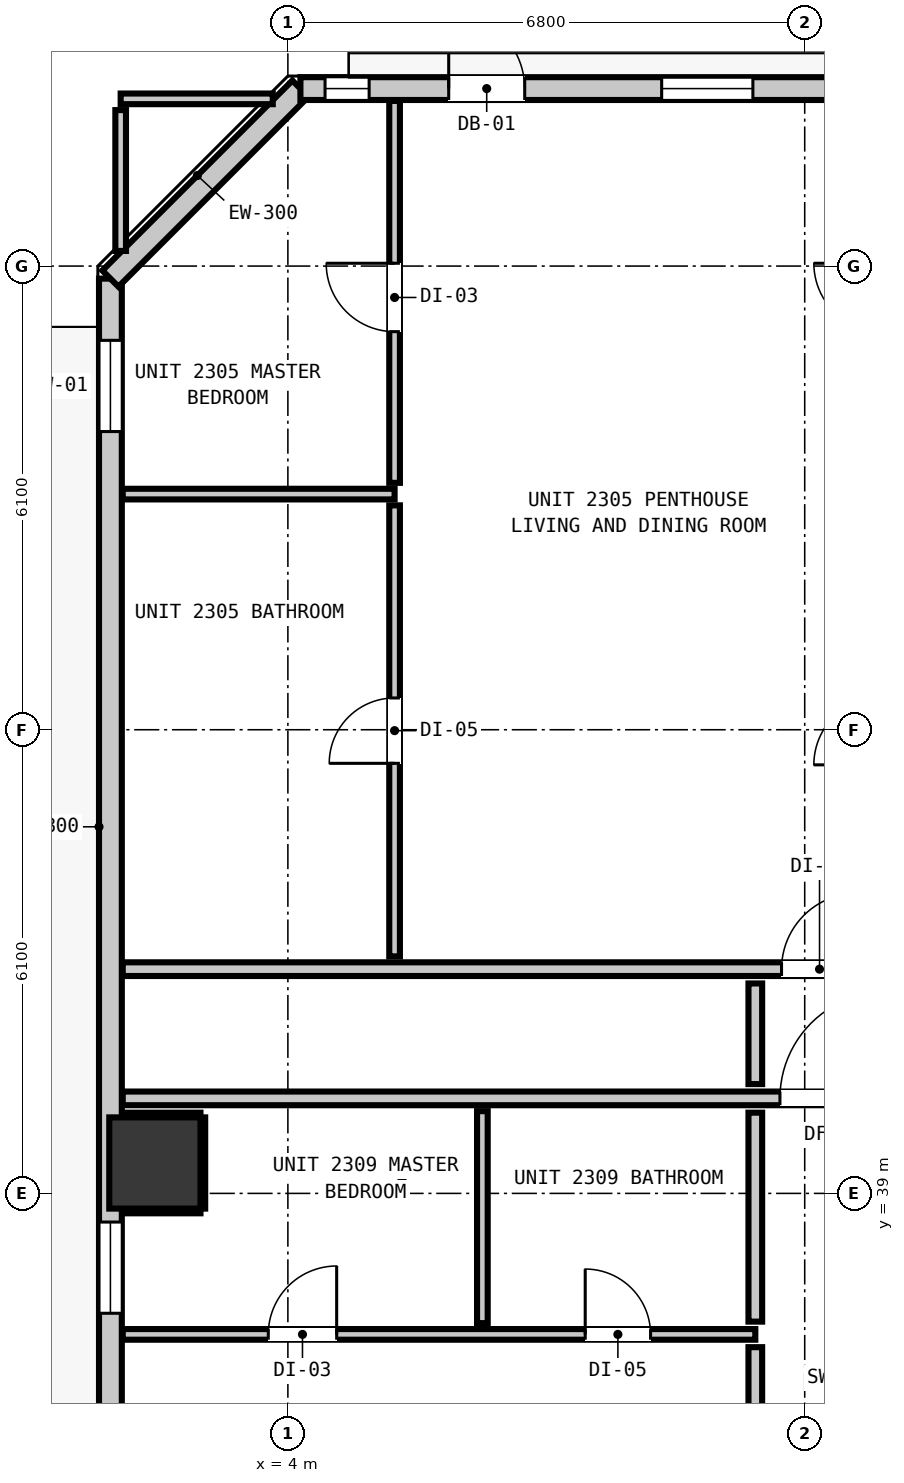
"""IFC4 building model, lengths in metres.
Left out: names, types, materials, properties, quantities, classifications, styles, units other than length and angle.
Written with IfcOpenShell. Run it as: python <this file> out.ifc"""

import sys

from ifc_helpers import new_model, si_unit, direction, frame, frame_2d, origin, origin_2d, place, context, subcontext, project, spatial, rectangle, extrude, element, fill, save


model = new_model("IFC4")
c1 = context("Model", 3, precision=1e-05, world=origin(), true_north=direction((0.0, 1.0)))
c2 = subcontext(c1, "Body", "Model", "MODEL_VIEW")
j1 = project(units=[si_unit("LENGTHUNIT", "METRE"), si_unit("PLANEANGLEUNIT", "RADIAN")], contexts=[c1])
p1 = place(None, origin())
s1 = spatial("IfcSite", under=j1, at=p1, CompositionType="ELEMENT")
p2 = place(p1, origin())
s2 = spatial("IfcBuilding", under=s1, at=p2, CompositionType="ELEMENT")
p3 = place(p2, frame((0.0, 0.0, 81.76)))
s3 = spatial("IfcBuildingStorey", under=s2, at=p3, CompositionType="ELEMENT", Elevation=81.76)
p4 = place(p3, frame((2.25, 39.4, -0.2), z_axis=(0.0, 0.0, 1.0), x_axis=(1.0, 0.0, 0.0)))
e1 = element("IfcColumn", 1, at=p4, inside=s3, PredefinedType="COLUMN", context=c2, shape_type="SweptSolid", body=[
    extrude(rectangle(XDim=1.2, YDim=1.2, at=origin_2d()), origin(), (0.0, 0.0, 1.0), 3.52),
])
p5 = place(p3, frame((1.665, 16.365, 0.0), z_axis=(0.0, 0.0, 1.0), x_axis=(0.0, 1.0, 0.0)))
e2 = element("IfcWall", 2, at=p5, inside=s3, PredefinedType="STANDARD", context=c2, shape_type="SweptSolid", body=[
    extrude(rectangle(XDim=34.67, YDim=0.3, at=frame_2d((17.335, 0.0))), origin(), (0.0, 0.0, 1.0), 3.06),
])
p6 = place(p5, frame((1.251, 0.0, 0.0)))
e3 = element("IfcOpeningElement", 3, at=p6, cuts=e2, PredefinedType="OPENING", context=c2, shape_type="SweptSolid", body=[
    extrude(rectangle(XDim=1.0, YDim=2.15, at=frame_2d((0.5, 1.075))), frame((0.0, 0.16, 0.0), z_axis=(0.0, -1.0, 0.0), x_axis=(1.0, 0.0, 0.0)), (0.0, 0.0, 1.0), 0.32),
])
p7 = place(p5, frame((32.658, 0.0, 0.85)))
e4 = element("IfcOpeningElement", 4, at=p7, cuts=e2, PredefinedType="OPENING", context=c2, shape_type="SweptSolid", body=[
    extrude(rectangle(XDim=1.2, YDim=1.8, at=frame_2d((0.6, 0.9))), frame((0.0, 0.16, 0.0), z_axis=(0.0, -1.0, 0.0), x_axis=(1.0, 0.0, 0.0)), (0.0, 0.0, 1.0), 0.32),
])
p8 = place(p5, frame((8.473, 0.0, 0.85)))
e5 = element("IfcOpeningElement", 5, at=p8, cuts=e2, PredefinedType="OPENING", context=c2, shape_type="SweptSolid", body=[
    extrude(rectangle(XDim=1.2, YDim=1.8, at=frame_2d((0.6, 0.9))), frame((0.0, 0.16, 0.0), z_axis=(0.0, -1.0, 0.0), x_axis=(1.0, 0.0, 0.0)), (0.0, 0.0, 1.0), 0.32),
])
p9 = place(p5, frame((11.623, 0.0, 0.85)))
e6 = element("IfcOpeningElement", 6, at=p9, cuts=e2, PredefinedType="OPENING", context=c2, shape_type="SweptSolid", body=[
    extrude(rectangle(XDim=1.2, YDim=1.8, at=frame_2d((0.6, 0.9))), frame((0.0, 0.16, 0.0), z_axis=(0.0, -1.0, 0.0), x_axis=(1.0, 0.0, 0.0)), (0.0, 0.0, 1.0), 0.32),
])
p10 = place(p5, frame((18.007, 0.0, 0.85)))
e7 = element("IfcOpeningElement", 7, at=p10, cuts=e2, PredefinedType="OPENING", context=c2, shape_type="SweptSolid", body=[
    extrude(rectangle(XDim=1.2, YDim=1.8, at=frame_2d((0.6, 0.9))), frame((0.0, 0.16, 0.0), z_axis=(0.0, -1.0, 0.0), x_axis=(1.0, 0.0, 0.0)), (0.0, 0.0, 1.0), 0.32),
])
p11 = place(p5, frame((21.058, 0.0, 0.85)))
e8 = element("IfcOpeningElement", 8, at=p11, cuts=e2, PredefinedType="OPENING", context=c2, shape_type="SweptSolid", body=[
    extrude(rectangle(XDim=1.2, YDim=1.8, at=frame_2d((0.6, 0.9))), frame((0.0, 0.16, 0.0), z_axis=(0.0, -1.0, 0.0), x_axis=(1.0, 0.0, 0.0)), (0.0, 0.0, 1.0), 0.32),
])
p12 = place(p3, frame((1.665, 51.035, 0.0), z_axis=(0.0, 0.0, 1.0), x_axis=(0.707106781187, 0.707106781187, 0.0)))
e9 = element("IfcWall", 9, at=p12, inside=s3, PredefinedType="STANDARD", context=c2, shape_type="SweptSolid", body=[
    extrude(rectangle(XDim=3.536, YDim=0.3, at=frame_2d((1.768, 0.0))), origin(), (0.0, 0.0, 1.0), 3.06),
])
p13 = place(p3, frame((4.165, 53.535, 0.0), z_axis=(0.0, 0.0, 1.0), x_axis=(1.0, 0.0, 0.0)))
e10 = element("IfcWall", 10, at=p13, inside=s3, PredefinedType="STANDARD", context=c2, shape_type="SweptSolid", body=[
    extrude(rectangle(XDim=37.47, YDim=0.3, at=frame_2d((18.735, 0.0))), origin(), (0.0, 0.0, 1.0), 3.06),
])
p14 = place(p13, frame((1.951, 0.0, 0.0)))
e11 = element("IfcOpeningElement", 11, at=p14, cuts=e10, PredefinedType="OPENING", context=c2, shape_type="SweptSolid", body=[
    extrude(rectangle(XDim=1.0, YDim=2.15, at=frame_2d((0.5, 1.075))), frame((0.0, 0.16, 0.0), z_axis=(0.0, -1.0, 0.0), x_axis=(1.0, 0.0, 0.0)), (0.0, 0.0, 1.0), 0.32),
])
p15 = place(p13, frame((4.753, 0.0, 0.85)))
e12 = element("IfcOpeningElement", 12, at=p15, cuts=e10, PredefinedType="OPENING", context=c2, shape_type="SweptSolid", body=[
    extrude(rectangle(XDim=1.2, YDim=1.8, at=frame_2d((0.6, 0.9))), frame((0.0, 0.16, 0.0), z_axis=(0.0, -1.0, 0.0), x_axis=(1.0, 0.0, 0.0)), (0.0, 0.0, 1.0), 0.32),
])
p16 = place(p13, frame((0.324, 0.0, 0.85)))
e13 = element("IfcOpeningElement", 13, at=p16, cuts=e10, PredefinedType="OPENING", context=c2, shape_type="SweptSolid", body=[
    extrude(rectangle(XDim=0.58, YDim=1.5, at=frame_2d((0.29, 0.75))), frame((0.0, 0.16, 0.0), z_axis=(0.0, -1.0, 0.0), x_axis=(1.0, 0.0, 0.0)), (0.0, 0.0, 1.0), 0.32),
])
p17 = place(p13, frame((10.571, 0.0, 0.85)))
e14 = element("IfcOpeningElement", 14, at=p17, cuts=e10, PredefinedType="OPENING", context=c2, shape_type="SweptSolid", body=[
    extrude(rectangle(XDim=1.2, YDim=1.8, at=frame_2d((0.6, 0.9))), frame((0.0, 0.16, 0.0), z_axis=(0.0, -1.0, 0.0), x_axis=(1.0, 0.0, 0.0)), (0.0, 0.0, 1.0), 0.32),
])
p18 = place(p13, frame((13.671, 0.0, 0.85)))
e15 = element("IfcOpeningElement", 15, at=p18, cuts=e10, PredefinedType="OPENING", context=c2, shape_type="SweptSolid", body=[
    extrude(rectangle(XDim=1.2, YDim=1.8, at=frame_2d((0.6, 0.9))), frame((0.0, 0.16, 0.0), z_axis=(0.0, -1.0, 0.0), x_axis=(1.0, 0.0, 0.0)), (0.0, 0.0, 1.0), 0.32),
])
p19 = place(p13, frame((28.747, 0.0, 0.85)))
e16 = element("IfcOpeningElement", 16, at=p19, cuts=e10, PredefinedType="OPENING", context=c2, shape_type="SweptSolid", body=[
    extrude(rectangle(XDim=1.2, YDim=1.8, at=frame_2d((0.6, 0.9))), frame((0.0, 0.16, 0.0), z_axis=(0.0, -1.0, 0.0), x_axis=(1.0, 0.0, 0.0)), (0.0, 0.0, 1.0), 0.32),
])
p20 = place(p13, frame((26.007, 0.0, 0.85)))
e17 = element("IfcOpeningElement", 17, at=p20, cuts=e10, PredefinedType="OPENING", context=c2, shape_type="SweptSolid", body=[
    extrude(rectangle(XDim=0.58, YDim=1.5, at=frame_2d((0.29, 0.75))), frame((0.0, 0.16, 0.0), z_axis=(0.0, -1.0, 0.0), x_axis=(1.0, 0.0, 0.0)), (0.0, 0.0, 1.0), 0.32),
])
p21 = place(p13, frame((35.832, 0.0, 0.85)))
e18 = element("IfcOpeningElement", 18, at=p21, cuts=e10, PredefinedType="OPENING", context=c2, shape_type="SweptSolid", body=[
    extrude(rectangle(XDim=1.2, YDim=1.8, at=frame_2d((0.6, 0.9))), frame((0.0, 0.16, 0.0), z_axis=(0.0, -1.0, 0.0), x_axis=(1.0, 0.0, 0.0)), (0.0, 0.0, 1.0), 0.32),
])
p22 = place(p3, frame((1.827, 40.25, 0.0), z_axis=(0.0, 0.0, 1.0), x_axis=(1.0, 0.0, 0.0)))
e19 = element("IfcWall", 19, at=p22, inside=s3, PredefinedType="PARTITIONING", context=c2, shape_type="SweptSolid", body=[
    extrude(rectangle(XDim=42.146, YDim=0.18, at=frame_2d((21.073, 0.0))), origin(), (0.0, 0.0, 1.0), 3.06),
])
p23 = place(p22, frame((15.608, 0.0, 0.0)))
e20 = element("IfcOpeningElement", 20, at=p23, cuts=e19, PredefinedType="OPENING", context=c2, shape_type="SweptSolid", body=[
    extrude(rectangle(XDim=1.4, YDim=2.15, at=frame_2d((0.7, 1.075))), frame((0.0, 0.1, 0.0), z_axis=(0.0, -1.0, 0.0), x_axis=(1.0, 0.0, 0.0)), (0.0, 0.0, 1.0), 0.2),
])
p24 = place(p22, frame((8.647, 0.0, 0.0)))
e21 = element("IfcOpeningElement", 21, at=p24, cuts=e19, PredefinedType="OPENING", context=c2, shape_type="SweptSolid", body=[
    extrude(rectangle(XDim=1.4, YDim=2.15, at=frame_2d((0.7, 1.075))), frame((0.0, 0.1, 0.0), z_axis=(0.0, -1.0, 0.0), x_axis=(1.0, 0.0, 0.0)), (0.0, 0.0, 1.0), 0.2),
])
p25 = place(p22, frame((38.524, 0.0, 0.0)))
e22 = element("IfcOpeningElement", 22, at=p25, cuts=e19, PredefinedType="OPENING", context=c2, shape_type="SweptSolid", body=[
    extrude(rectangle(XDim=1.0, YDim=2.15, at=frame_2d((0.5, 1.075))), frame((0.0, 0.1, 0.0), z_axis=(0.0, -1.0, 0.0), x_axis=(1.0, 0.0, 0.0)), (0.0, 0.0, 1.0), 0.2),
])
p26 = place(p3, frame((1.827, 41.95, 0.0), z_axis=(0.0, 0.0, 1.0), x_axis=(1.0, 0.0, 0.0)))
e23 = element("IfcWall", 23, at=p26, inside=s3, PredefinedType="PARTITIONING", context=c2, shape_type="SweptSolid", body=[
    extrude(rectangle(XDim=42.146, YDim=0.18, at=frame_2d((21.073, 0.0))), origin(), (0.0, 0.0, 1.0), 3.06),
])
p27 = place(p26, frame((8.668, 0.0, 0.0)))
e24 = element("IfcOpeningElement", 24, at=p27, cuts=e23, PredefinedType="OPENING", context=c2, shape_type="SweptSolid", body=[
    extrude(rectangle(XDim=1.0, YDim=2.15, at=frame_2d((0.5, 1.075))), frame((0.0, 0.1, 0.0), z_axis=(0.0, -1.0, 0.0), x_axis=(1.0, 0.0, 0.0)), (0.0, 0.0, 1.0), 0.2),
])
p28 = place(p26, frame((18.269, 0.0, 0.0)))
e25 = element("IfcOpeningElement", 25, at=p28, cuts=e23, PredefinedType="OPENING", context=c2, shape_type="SweptSolid", body=[
    extrude(rectangle(XDim=1.0, YDim=2.15, at=frame_2d((0.5, 1.075))), frame((0.0, 0.1, 0.0), z_axis=(0.0, -1.0, 0.0), x_axis=(1.0, 0.0, 0.0)), (0.0, 0.0, 1.0), 0.2),
])
p29 = place(p26, frame((33.01, 0.0, 0.0)))
e26 = element("IfcOpeningElement", 26, at=p29, cuts=e23, PredefinedType="OPENING", context=c2, shape_type="SweptSolid", body=[
    extrude(rectangle(XDim=1.0, YDim=2.15, at=frame_2d((0.5, 1.075))), frame((0.0, 0.1, 0.0), z_axis=(0.0, -1.0, 0.0), x_axis=(1.0, 0.0, 0.0)), (0.0, 0.0, 1.0), 0.2),
])
p30 = place(p3, frame((1.827, 37.145, 0.0), z_axis=(0.0, 0.0, 1.0), x_axis=(1.0, 0.0, 0.0)))
e27 = element("IfcWall", 27, at=p30, inside=s3, PredefinedType="PARTITIONING", context=c2, shape_type="SweptSolid", body=[
    extrude(rectangle(XDim=8.323, YDim=0.14, at=frame_2d((4.162, 0.0))), origin(), (0.0, 0.0, 1.0), 3.06),
])
p31 = place(p30, frame((6.085, 0.0, 0.0)))
e28 = element("IfcOpeningElement", 28, at=p31, cuts=e27, PredefinedType="OPENING", context=c2, shape_type="SweptSolid", body=[
    extrude(rectangle(XDim=0.86, YDim=2.02, at=frame_2d((0.43, 1.01))), frame((0.0, 0.08, 0.0), z_axis=(0.0, -1.0, 0.0), x_axis=(1.0, 0.0, 0.0)), (0.0, 0.0, 1.0), 0.16),
])
p32 = place(p30, frame((1.915, 0.0, 0.0)))
e29 = element("IfcOpeningElement", 29, at=p32, cuts=e27, PredefinedType="OPENING", context=c2, shape_type="SweptSolid", body=[
    extrude(rectangle(XDim=0.9, YDim=2.1, at=frame_2d((0.45, 1.05))), frame((0.0, 0.08, 0.0), z_axis=(0.0, -1.0, 0.0), x_axis=(1.0, 0.0, 0.0)), (0.0, 0.0, 1.0), 0.16),
])
p33 = place(p3, frame((1.827, 48.2, 0.0), z_axis=(0.0, 0.0, 1.0), x_axis=(1.0, 0.0, 0.0)))
e30 = element("IfcWall", 30, at=p33, inside=s3, PredefinedType="PARTITIONING", context=c2, shape_type="SweptSolid", body=[
    extrude(rectangle(XDim=3.577, YDim=0.14, at=frame_2d((1.789, 0.0))), origin(), (0.0, 0.0, 1.0), 3.06),
])
p34 = place(p3, frame((1.8, 53.4, 0.0), z_axis=(0.0, 0.0, 1.0), x_axis=(1.0, 0.0, 0.0)))
e31 = element("IfcWall", 31, at=p34, inside=s3, PredefinedType="PARTITIONING", context=c2, shape_type="SweptSolid", body=[
    extrude(rectangle(XDim=2.001, YDim=0.14, at=frame_2d((1.0, 0.0))), origin(), (0.0, 0.0, 1.0), 3.06),
])
p35 = place(p3, frame((10.15, 33.118, 0.0), z_axis=(0.0, 0.0, 1.0), x_axis=(0.0, 1.0, 0.0)))
e32 = element("IfcWall", 32, at=p35, inside=s3, PredefinedType="PARTITIONING", context=c2, shape_type="SweptSolid", body=[
    extrude(rectangle(XDim=3.859, YDim=0.18, at=frame_2d((1.93, 0.0))), origin(), (0.0, 0.0, 1.0), 3.06),
])
p36 = place(p35, frame((1.353, 0.0, 0.0)))
e33 = element("IfcOpeningElement", 33, at=p36, cuts=e32, PredefinedType="OPENING", context=c2, shape_type="SweptSolid", body=[
    extrude(rectangle(XDim=1.0, YDim=2.15, at=frame_2d((0.5, 1.075))), frame((0.0, 0.1, 0.0), z_axis=(0.0, -1.0, 0.0), x_axis=(1.0, 0.0, 0.0)), (0.0, 0.0, 1.0), 0.2),
])
p37 = place(p3, frame((10.15, 37.313, 0.0), z_axis=(0.0, 0.0, 1.0), x_axis=(0.0, 1.0, 0.0)))
e34 = element("IfcWall", 34, at=p37, inside=s3, PredefinedType="PARTITIONING", context=c2, shape_type="SweptSolid", body=[
    extrude(rectangle(XDim=2.749, YDim=0.18, at=frame_2d((1.375, 0.0))), origin(), (0.0, 0.0, 1.0), 3.06),
])
p38 = place(p3, frame((10.15, 40.438, 0.0), z_axis=(0.0, 0.0, 1.0), x_axis=(0.0, 1.0, 0.0)))
e35 = element("IfcWall", 35, at=p38, inside=s3, PredefinedType="PARTITIONING", context=c2, shape_type="SweptSolid", body=[
    extrude(rectangle(XDim=1.324, YDim=0.18, at=frame_2d((0.662, 0.0))), origin(), (0.0, 0.0, 1.0), 3.06),
])
p39 = place(p3, frame((1.8, 51.399, 0.0), z_axis=(0.0, 0.0, 1.0), x_axis=(0.0, 1.0, 0.0)))
e36 = element("IfcWall", 36, at=p39, inside=s3, PredefinedType="PARTITIONING", context=c2, shape_type="SweptSolid", body=[
    extrude(rectangle(XDim=1.853, YDim=0.14, at=frame_2d((0.927, 0.0))), origin(), (0.0, 0.0, 1.0), 3.06),
])
p40 = place(p3, frame((5.404, 42.118, 0.0), z_axis=(0.0, 0.0, 1.0), x_axis=(0.0, 1.0, 0.0)))
e37 = element("IfcWall", 37, at=p40, inside=s3, PredefinedType="PARTITIONING", context=c2, shape_type="SweptSolid", body=[
    extrude(rectangle(XDim=5.934, YDim=0.14, at=frame_2d((2.967, 0.0))), origin(), (0.0, 0.0, 1.0), 3.06),
])
p41 = place(p40, frame((2.54, 0.0, 0.0)))
e38 = element("IfcOpeningElement", 38, at=p41, cuts=e37, PredefinedType="OPENING", context=c2, shape_type="SweptSolid", body=[
    extrude(rectangle(XDim=0.86, YDim=2.02, at=frame_2d((0.43, 1.01))), frame((0.0, 0.08, 0.0), z_axis=(0.0, -1.0, 0.0), x_axis=(1.0, 0.0, 0.0)), (0.0, 0.0, 1.0), 0.16),
])
p42 = place(p3, frame((5.404, 48.348, 0.0), z_axis=(0.0, 0.0, 1.0), x_axis=(0.0, 1.0, 0.0)))
e39 = element("IfcWall", 39, at=p42, inside=s3, PredefinedType="PARTITIONING", context=c2, shape_type="SweptSolid", body=[
    extrude(rectangle(XDim=5.025, YDim=0.14, at=frame_2d((2.513, 0.0))), origin(), (0.0, 0.0, 1.0), 3.06),
])
p43 = place(p42, frame((1.989, 0.0, 0.0)))
e40 = element("IfcOpeningElement", 40, at=p43, cuts=e39, PredefinedType="OPENING", context=c2, shape_type="SweptSolid", body=[
    extrude(rectangle(XDim=0.9, YDim=2.1, at=frame_2d((0.45, 1.05))), frame((0.0, 0.08, 0.0), z_axis=(0.0, -1.0, 0.0), x_axis=(1.0, 0.0, 0.0)), (0.0, 0.0, 1.0), 0.16),
])
p44 = place(p3, frame((6.559, 37.293, 0.0), z_axis=(0.0, 0.0, 1.0), x_axis=(0.0, 1.0, 0.0)))
e41 = element("IfcWall", 41, at=p44, inside=s3, PredefinedType="PARTITIONING", context=c2, shape_type="SweptSolid", body=[
    extrude(rectangle(XDim=2.789, YDim=0.14, at=frame_2d((1.395, 0.0))), origin(), (0.0, 0.0, 1.0), 3.06),
])
for number, where, z_axis, x_axis in (
    (42, (1.83, 38.768, 0.0), (0.0, 0.0, 1.0), (1.0, 0.0, 0.0)),
    (43, (1.83, 40.032, 0.0), (0.0, 0.0, 1.0), (1.0, 0.0, 0.0)),
):
    element("IfcWall", number, at=place(p3, frame(where, z_axis=z_axis, x_axis=x_axis)), inside=s3, PredefinedType="PARTITIONING", context=c2, shape_type="SweptSolid", body=[
        extrude(rectangle(XDim=1.02, YDim=0.06, at=frame_2d((0.51, 0.0))), origin(), (0.0, 0.0, 1.0), 1.45),
    ])
p45 = place(p3, frame((2.882, 38.8, 0.0), z_axis=(0.0, 0.0, 1.0), x_axis=(0.0, 1.0, 0.0)))
e44 = element("IfcWall", 44, at=p45, inside=s3, PredefinedType="PARTITIONING", context=c2, shape_type="SweptSolid", body=[
    extrude(rectangle(XDim=1.2, YDim=0.06, at=frame_2d((0.6, 0.0))), origin(), (0.0, 0.0, 1.0), 1.45),
])
p46 = place(p14, origin())
e45 = element("IfcDoor", 45, at=p46, inside=s3, OperationType="SINGLE_SWING_LEFT", PredefinedType="DOOR", context=c2, shape_type="SweptSolid", body=[
    extrude(rectangle(XDim=1.0, YDim=2.15, at=frame_2d((0.5, 1.075))), frame((0.0, 0.025, 0.0), z_axis=(0.0, -1.0, 0.0), x_axis=(1.0, 0.0, 0.0)), (0.0, 0.0, 1.0), 0.05),
])
fill(e11, e45)
p47 = place(p7, origin())
e46 = element("IfcWindow", 46, at=p47, inside=s3, PartitioningType="SINGLE_PANEL", PredefinedType="WINDOW", context=c2, shape_type="SweptSolid", body=[
    extrude(rectangle(XDim=1.2, YDim=1.8, at=frame_2d((0.6, 0.9))), frame((0.0, 0.03, 0.0), z_axis=(0.0, -1.0, 0.0), x_axis=(1.0, 0.0, 0.0)), (0.0, 0.0, 1.0), 0.06),
])
fill(e4, e46)
p48 = place(p11, origin())
e47 = element("IfcWindow", 47, at=p48, inside=s3, PartitioningType="SINGLE_PANEL", PredefinedType="WINDOW", context=c2, shape_type="SweptSolid", body=[
    extrude(rectangle(XDim=1.2, YDim=1.8, at=frame_2d((0.6, 0.9))), frame((0.0, 0.03, 0.0), z_axis=(0.0, -1.0, 0.0), x_axis=(1.0, 0.0, 0.0)), (0.0, 0.0, 1.0), 0.06),
])
fill(e8, e47)
p49 = place(p15, origin())
e48 = element("IfcWindow", 48, at=p49, inside=s3, PartitioningType="SINGLE_PANEL", PredefinedType="WINDOW", context=c2, shape_type="SweptSolid", body=[
    extrude(rectangle(XDim=1.2, YDim=1.8, at=frame_2d((0.6, 0.9))), frame((0.0, 0.03, 0.0), z_axis=(0.0, -1.0, 0.0), x_axis=(1.0, 0.0, 0.0)), (0.0, 0.0, 1.0), 0.06),
])
fill(e12, e48)
p50 = place(p16, origin())
e49 = element("IfcWindow", 49, at=p50, inside=s3, PartitioningType="SINGLE_PANEL", PredefinedType="WINDOW", context=c2, shape_type="SweptSolid", body=[
    extrude(rectangle(XDim=0.58, YDim=1.5, at=frame_2d((0.29, 0.75))), frame((0.0, 0.03, 0.0), z_axis=(0.0, -1.0, 0.0), x_axis=(1.0, 0.0, 0.0)), (0.0, 0.0, 1.0), 0.06),
])
fill(e13, e49)
p51 = place(p24, origin())
e50 = element("IfcDoor", 50, at=p51, inside=s3, OperationType="SINGLE_SWING_RIGHT", PredefinedType="DOOR", context=c2, shape_type="SweptSolid", body=[
    extrude(rectangle(XDim=1.4, YDim=2.15, at=frame_2d((0.7, 1.075))), frame((0.0, 0.025, 0.0), z_axis=(0.0, -1.0, 0.0), x_axis=(1.0, 0.0, 0.0)), (0.0, 0.0, 1.0), 0.05),
])
fill(e21, e50)
p52 = place(p27, origin())
e51 = element("IfcDoor", 51, at=p52, inside=s3, OperationType="SINGLE_SWING_RIGHT", PredefinedType="DOOR", context=c2, shape_type="SweptSolid", body=[
    extrude(rectangle(XDim=1.0, YDim=2.15, at=frame_2d((0.5, 1.075))), frame((0.0, 0.025, 0.0), z_axis=(0.0, -1.0, 0.0), x_axis=(1.0, 0.0, 0.0)), (0.0, 0.0, 1.0), 0.05),
])
fill(e24, e51)
p53 = place(p41, origin())
e52 = element("IfcDoor", 52, at=p53, inside=s3, OperationType="SINGLE_SWING_LEFT", PredefinedType="DOOR", context=c2, shape_type="SweptSolid", body=[
    extrude(rectangle(XDim=0.86, YDim=2.02, at=frame_2d((0.43, 1.01))), frame((0.0, 0.025, 0.0), z_axis=(0.0, -1.0, 0.0), x_axis=(1.0, 0.0, 0.0)), (0.0, 0.0, 1.0), 0.05),
])
fill(e38, e52)
p54 = place(p43, origin())
e53 = element("IfcDoor", 53, at=p54, inside=s3, OperationType="SINGLE_SWING_RIGHT", PredefinedType="DOOR", context=c2, shape_type="SweptSolid", body=[
    extrude(rectangle(XDim=0.9, YDim=2.1, at=frame_2d((0.45, 1.05))), frame((0.0, 0.025, 0.0), z_axis=(0.0, -1.0, 0.0), x_axis=(1.0, 0.0, 0.0)), (0.0, 0.0, 1.0), 0.05),
])
fill(e40, e53)
p55 = place(p31, origin())
e54 = element("IfcDoor", 54, at=p55, inside=s3, OperationType="SINGLE_SWING_LEFT", PredefinedType="DOOR", context=c2, shape_type="SweptSolid", body=[
    extrude(rectangle(XDim=0.86, YDim=2.02, at=frame_2d((0.43, 1.01))), frame((0.0, 0.025, 0.0), z_axis=(0.0, -1.0, 0.0), x_axis=(1.0, 0.0, 0.0)), (0.0, 0.0, 1.0), 0.05),
])
fill(e28, e54)
p56 = place(p32, origin())
e55 = element("IfcDoor", 55, at=p56, inside=s3, OperationType="SINGLE_SWING_RIGHT", PredefinedType="DOOR", context=c2, shape_type="SweptSolid", body=[
    extrude(rectangle(XDim=0.9, YDim=2.1, at=frame_2d((0.45, 1.05))), frame((0.0, 0.025, 0.0), z_axis=(0.0, -1.0, 0.0), x_axis=(1.0, 0.0, 0.0)), (0.0, 0.0, 1.0), 0.05),
])
fill(e29, e55)
save(model, sys.argv[1])
